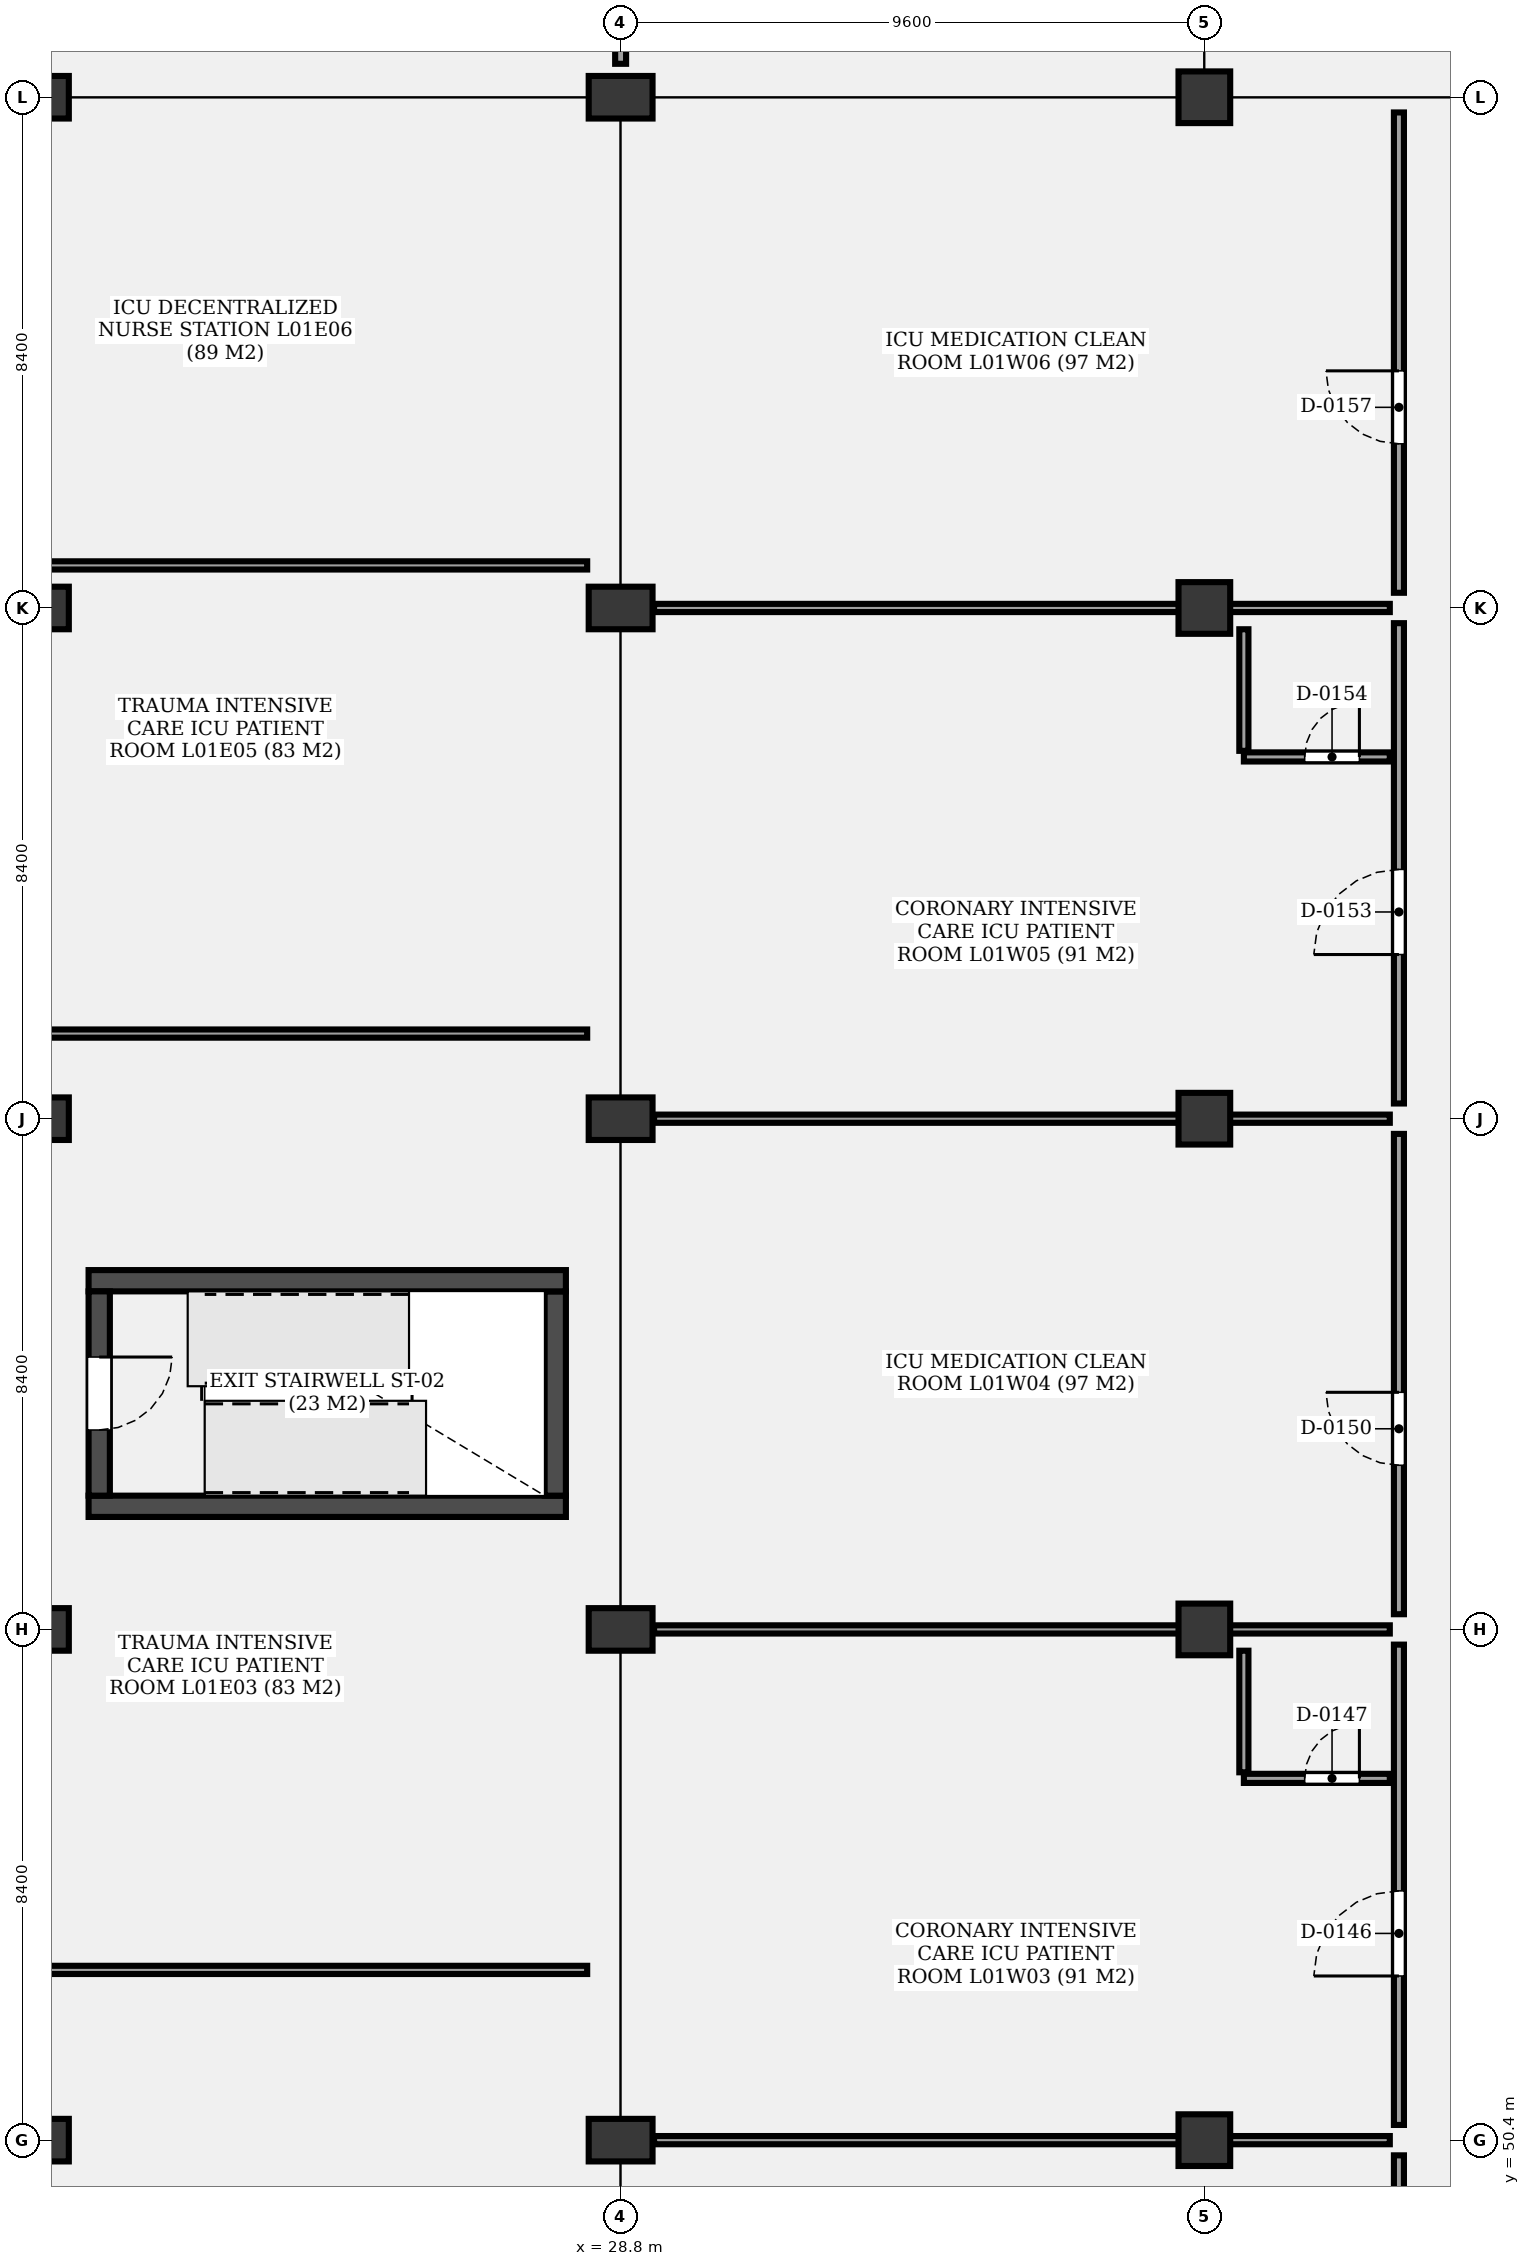
"""IFC4 building model, lengths in metres.
Left out: names, types, materials, properties, quantities, classifications, styles, units other than length and angle.
Written with IfcOpenShell. Run it as: python <this file> out.ifc"""

import sys

from ifc_helpers import new_model, si_unit, direction, frame, frame_2d, origin, origin_2d, place, context, subcontext, project, spatial, rectangle, extrude, element, fill, save


model = new_model("IFC4")
c1 = context("Model", 3, precision=1e-05, world=origin(), true_north=direction((0.0, 1.0)))
c2 = subcontext(c1, "Body", "Model", "MODEL_VIEW")
j1 = project(units=[si_unit("LENGTHUNIT", "METRE"), si_unit("PLANEANGLEUNIT", "RADIAN")], contexts=[c1])
p1 = place(None, origin())
s1 = spatial("IfcSite", under=j1, at=p1, CompositionType="ELEMENT")
p2 = place(p1, origin())
s2 = spatial("IfcBuilding", under=s1, at=p2, CompositionType="ELEMENT")
p3 = place(p2, frame((0.0, 0.0, 5.1)))
s3 = spatial("IfcBuildingStorey", under=s2, at=p3, CompositionType="ELEMENT", Elevation=5.1)
for number, where, z_axis, x_axis in (
    (1, (19.2, 50.4, 0.0), (0.0, 0.0, 1.0), (1.0, 0.0, 0.0)),
    (2, (19.2, 58.8, 0.0), (0.0, 0.0, 1.0), (1.0, 0.0, 0.0)),
    (3, (19.2, 67.2, 0.0), (0.0, 0.0, 1.0), (1.0, 0.0, 0.0)),
    (4, (19.2, 75.6, 0.0), (0.0, 0.0, 1.0), (1.0, 0.0, 0.0)),
    (5, (19.2, 84.0, 0.0), (0.0, 0.0, 1.0), (1.0, 0.0, 0.0)),
    (6, (28.8, 50.4, 0.0), (0.0, 0.0, 1.0), (1.0, 0.0, 0.0)),
    (7, (28.8, 58.8, 0.0), (0.0, 0.0, 1.0), (1.0, 0.0, 0.0)),
    (8, (28.8, 67.2, 0.0), (0.0, 0.0, 1.0), (1.0, 0.0, 0.0)),
    (9, (28.8, 75.6, 0.0), (0.0, 0.0, 1.0), (1.0, 0.0, 0.0)),
    (10, (28.8, 84.0, 0.0), (0.0, 0.0, 1.0), (1.0, 0.0, 0.0)),
):
    element("IfcColumn", number, at=place(p3, frame(where, z_axis=z_axis, x_axis=x_axis)), inside=s3, PredefinedType="COLUMN", context=c2, shape_type="SweptSolid", body=[
        extrude(rectangle(XDim=1.05, YDim=0.7, at=origin_2d()), origin(), (0.0, 0.0, 1.0), 4.8),
    ])
for number, where, z_axis, x_axis in (
    (11, (38.4, 50.4, 0.0), (0.0, 0.0, 1.0), (1.0, 0.0, 0.0)),
    (12, (38.4, 58.8, 0.0), (0.0, 0.0, 1.0), (1.0, 0.0, 0.0)),
    (13, (38.4, 67.2, 0.0), (0.0, 0.0, 1.0), (1.0, 0.0, 0.0)),
    (14, (38.4, 75.6, 0.0), (0.0, 0.0, 1.0), (1.0, 0.0, 0.0)),
    (15, (38.4, 84.0, 0.0), (0.0, 0.0, 1.0), (1.0, 0.0, 0.0)),
):
    element("IfcColumn", number, at=place(p3, frame(where, z_axis=z_axis, x_axis=x_axis)), inside=s3, PredefinedType="COLUMN", context=c2, shape_type="SweptSolid", body=[
        extrude(rectangle(XDim=0.85, YDim=0.85, at=origin_2d()), origin(), (0.0, 0.0, 1.0), 4.8),
    ])
p4 = place(p3, frame((20.05, 60.825, 0.0), z_axis=(0.0, 0.0, 1.0), x_axis=(1.0, 0.0, 0.0)))
e16 = element("IfcWall", 16, at=p4, inside=s3, PredefinedType="SHEAR", context=c2, shape_type="SweptSolid", body=[
    extrude(rectangle(XDim=7.85, YDim=0.35, at=frame_2d((3.925, 0.0))), origin(), (0.0, 0.0, 1.0), 4.8),
])
p5 = place(p3, frame((27.725, 61.0, 0.0), z_axis=(0.0, 0.0, 1.0), x_axis=(0.0, 1.0, 0.0)))
e17 = element("IfcWall", 17, at=p5, inside=s3, PredefinedType="SHEAR", context=c2, shape_type="SweptSolid", body=[
    extrude(rectangle(XDim=3.36, YDim=0.35, at=frame_2d((1.68, 0.0))), origin(), (0.0, 0.0, 1.0), 4.8),
])
p6 = place(p3, frame((27.9, 64.535, 0.0), z_axis=(0.0, 0.0, 1.0), x_axis=(-1.0, 0.0, 0.0)))
e18 = element("IfcWall", 18, at=p6, inside=s3, PredefinedType="SHEAR", context=c2, shape_type="SweptSolid", body=[
    extrude(rectangle(XDim=7.85, YDim=0.35, at=frame_2d((3.925, 0.0))), origin(), (0.0, 0.0, 1.0), 4.8),
])
p7 = place(p3, frame((20.225, 64.36, 0.0), z_axis=(0.0, 0.0, 1.0), x_axis=(0.0, -1.0, 0.0)))
e19 = element("IfcWall", 19, at=p7, inside=s3, PredefinedType="SHEAR", context=c2, shape_type="SweptSolid", body=[
    extrude(rectangle(XDim=3.36, YDim=0.35, at=frame_2d((1.68, 0.0))), origin(), (0.0, 0.0, 1.0), 4.8),
])
p8 = place(p7, frame((1.08, 0.0, 0.0)))
e20 = element("IfcOpeningElement", 20, at=p8, cuts=e19, PredefinedType="OPENING", context=c2, shape_type="SweptSolid", body=[
    extrude(rectangle(XDim=1.2, YDim=2.2, at=frame_2d((0.6, 1.1))), frame((0.0, 0.185, 0.0), z_axis=(0.0, -1.0, 0.0), x_axis=(1.0, 0.0, 0.0)), (0.0, 0.0, 1.0), 0.37),
])
p9 = place(p3, frame((28.8, 84.55, 0.0), z_axis=(0.0, 0.0, 1.0), x_axis=(0.0, 1.0, 0.0)))
e21 = element("IfcWall", 21, at=p9, inside=s3, PredefinedType="PARTITIONING", context=c2, shape_type="SweptSolid", body=[
    extrude(rectangle(XDim=17.3, YDim=0.18, at=frame_2d((8.65, 0.0))), origin(), (0.0, 0.0, 1.0), 3.68),
])
for number, where, z_axis, x_axis in (
    (22, (16.15, 53.2, 0.0), (0.0, 0.0, 1.0), (1.0, 0.0, 0.0)),
    (23, (16.15, 68.6, 0.0), (0.0, 0.0, 1.0), (1.0, 0.0, 0.0)),
    (24, (16.15, 76.3, 0.0), (0.0, 0.0, 1.0), (1.0, 0.0, 0.0)),
):
    element("IfcWall", number, at=place(p3, frame(where, z_axis=z_axis, x_axis=x_axis)), inside=s3, PredefinedType="PARTITIONING", context=c2, shape_type="SweptSolid", body=[
        extrude(rectangle(XDim=12.1, YDim=0.135, at=frame_2d((6.05, 0.0))), origin(), (0.0, 0.0, 1.0), 3.68),
    ])
p10 = place(p3, frame((41.6, 42.25, 0.0), z_axis=(0.0, 0.0, 1.0), x_axis=(0.0, 1.0, 0.0)))
e25 = element("IfcWall", 25, at=p10, inside=s3, PredefinedType="PARTITIONING", context=c2, shape_type="SweptSolid", body=[
    extrude(rectangle(XDim=7.9, YDim=0.165, at=frame_2d((3.95, 0.0))), origin(), (0.0, 0.0, 1.0), 3.68),
])
p11 = place(p10, frame((2.45, 0.0, 0.0)))
e26 = element("IfcOpeningElement", 26, at=p11, cuts=e25, PredefinedType="OPENING", context=c2, shape_type="SweptSolid", body=[
    extrude(rectangle(XDim=1.2, YDim=2.4, at=frame_2d((0.6, 1.2))), frame((0.0, 0.093, 0.0), z_axis=(0.0, -1.0, 0.0), x_axis=(1.0, 0.0, 0.0)), (0.0, 0.0, 1.0), 0.185),
])
p12 = place(p3, frame((41.6, 50.65, 0.0), z_axis=(0.0, 0.0, 1.0), x_axis=(0.0, 1.0, 0.0)))
e27 = element("IfcWall", 27, at=p12, inside=s3, PredefinedType="PARTITIONING", context=c2, shape_type="SweptSolid", body=[
    extrude(rectangle(XDim=7.9, YDim=0.165, at=frame_2d((3.95, 0.0))), origin(), (0.0, 0.0, 1.0), 3.68),
])
p13 = place(p12, frame((2.45, 0.0, 0.0)))
e28 = element("IfcOpeningElement", 28, at=p13, cuts=e27, PredefinedType="OPENING", context=c2, shape_type="SweptSolid", body=[
    extrude(rectangle(XDim=1.4, YDim=2.4, at=frame_2d((0.7, 1.2))), frame((0.0, 0.093, 0.0), z_axis=(0.0, -1.0, 0.0), x_axis=(1.0, 0.0, 0.0)), (0.0, 0.0, 1.0), 0.185),
])
p14 = place(p3, frame((39.05, 56.35, 0.0), z_axis=(0.0, 0.0, 1.0), x_axis=(1.0, 0.0, 0.0)))
e29 = element("IfcWall", 29, at=p14, inside=s3, PredefinedType="PARTITIONING", context=c2, shape_type="SweptSolid", body=[
    extrude(rectangle(XDim=2.4, YDim=0.15, at=frame_2d((1.2, 0.0))), origin(), (0.0, 0.0, 1.0), 3.68),
])
p15 = place(p14, frame((1.0, 0.0, 0.0)))
e30 = element("IfcOpeningElement", 30, at=p15, cuts=e29, PredefinedType="OPENING", context=c2, shape_type="SweptSolid", body=[
    extrude(rectangle(XDim=0.9, YDim=2.1, at=frame_2d((0.45, 1.05))), frame((0.0, 0.085, 0.0), z_axis=(0.0, -1.0, 0.0), x_axis=(1.0, 0.0, 0.0)), (0.0, 0.0, 1.0), 0.17),
])
p16 = place(p3, frame((39.05, 56.45, 0.0), z_axis=(0.0, 0.0, 1.0), x_axis=(0.0, 1.0, 0.0)))
e31 = element("IfcWall", 31, at=p16, inside=s3, PredefinedType="PARTITIONING", context=c2, shape_type="SweptSolid", body=[
    extrude(rectangle(XDim=2.0, YDim=0.15, at=frame_2d((1.0, 0.0))), origin(), (0.0, 0.0, 1.0), 3.68),
])
p17 = place(p3, frame((29.35, 50.4, 0.0), z_axis=(0.0, 0.0, 1.0), x_axis=(1.0, 0.0, 0.0)))
e32 = element("IfcWall", 32, at=p17, inside=s3, PredefinedType="PARTITIONING", context=c2, shape_type="SweptSolid", body=[
    extrude(rectangle(XDim=12.1, YDim=0.135, at=frame_2d((6.05, 0.0))), origin(), (0.0, 0.0, 1.0), 3.68),
])
p18 = place(p3, frame((41.6, 59.05, 0.0), z_axis=(0.0, 0.0, 1.0), x_axis=(0.0, 1.0, 0.0)))
e33 = element("IfcWall", 33, at=p18, inside=s3, PredefinedType="PARTITIONING", context=c2, shape_type="SweptSolid", body=[
    extrude(rectangle(XDim=7.9, YDim=0.165, at=frame_2d((3.95, 0.0))), origin(), (0.0, 0.0, 1.0), 3.68),
])
p19 = place(p18, frame((2.45, 0.0, 0.0)))
e34 = element("IfcOpeningElement", 34, at=p19, cuts=e33, PredefinedType="OPENING", context=c2, shape_type="SweptSolid", body=[
    extrude(rectangle(XDim=1.2, YDim=2.4, at=frame_2d((0.6, 1.2))), frame((0.0, 0.093, 0.0), z_axis=(0.0, -1.0, 0.0), x_axis=(1.0, 0.0, 0.0)), (0.0, 0.0, 1.0), 0.185),
])
p20 = place(p3, frame((29.35, 58.8, 0.0), z_axis=(0.0, 0.0, 1.0), x_axis=(1.0, 0.0, 0.0)))
e35 = element("IfcWall", 35, at=p20, inside=s3, PredefinedType="PARTITIONING", context=c2, shape_type="SweptSolid", body=[
    extrude(rectangle(XDim=12.1, YDim=0.135, at=frame_2d((6.05, 0.0))), origin(), (0.0, 0.0, 1.0), 3.68),
])
p21 = place(p3, frame((41.6, 67.45, 0.0), z_axis=(0.0, 0.0, 1.0), x_axis=(0.0, 1.0, 0.0)))
e36 = element("IfcWall", 36, at=p21, inside=s3, PredefinedType="PARTITIONING", context=c2, shape_type="SweptSolid", body=[
    extrude(rectangle(XDim=7.9, YDim=0.165, at=frame_2d((3.95, 0.0))), origin(), (0.0, 0.0, 1.0), 3.68),
])
p22 = place(p21, frame((2.45, 0.0, 0.0)))
e37 = element("IfcOpeningElement", 37, at=p22, cuts=e36, PredefinedType="OPENING", context=c2, shape_type="SweptSolid", body=[
    extrude(rectangle(XDim=1.4, YDim=2.4, at=frame_2d((0.7, 1.2))), frame((0.0, 0.093, 0.0), z_axis=(0.0, -1.0, 0.0), x_axis=(1.0, 0.0, 0.0)), (0.0, 0.0, 1.0), 0.185),
])
p23 = place(p3, frame((39.05, 73.15, 0.0), z_axis=(0.0, 0.0, 1.0), x_axis=(1.0, 0.0, 0.0)))
e38 = element("IfcWall", 38, at=p23, inside=s3, PredefinedType="PARTITIONING", context=c2, shape_type="SweptSolid", body=[
    extrude(rectangle(XDim=2.4, YDim=0.15, at=frame_2d((1.2, 0.0))), origin(), (0.0, 0.0, 1.0), 3.68),
])
p24 = place(p23, frame((1.0, 0.0, 0.0)))
e39 = element("IfcOpeningElement", 39, at=p24, cuts=e38, PredefinedType="OPENING", context=c2, shape_type="SweptSolid", body=[
    extrude(rectangle(XDim=0.9, YDim=2.1, at=frame_2d((0.45, 1.05))), frame((0.0, 0.085, 0.0), z_axis=(0.0, -1.0, 0.0), x_axis=(1.0, 0.0, 0.0)), (0.0, 0.0, 1.0), 0.17),
])
p25 = place(p3, frame((39.05, 73.25, 0.0), z_axis=(0.0, 0.0, 1.0), x_axis=(0.0, 1.0, 0.0)))
e40 = element("IfcWall", 40, at=p25, inside=s3, PredefinedType="PARTITIONING", context=c2, shape_type="SweptSolid", body=[
    extrude(rectangle(XDim=2.0, YDim=0.15, at=frame_2d((1.0, 0.0))), origin(), (0.0, 0.0, 1.0), 3.68),
])
p26 = place(p3, frame((29.35, 67.2, 0.0), z_axis=(0.0, 0.0, 1.0), x_axis=(1.0, 0.0, 0.0)))
e41 = element("IfcWall", 41, at=p26, inside=s3, PredefinedType="PARTITIONING", context=c2, shape_type="SweptSolid", body=[
    extrude(rectangle(XDim=12.1, YDim=0.135, at=frame_2d((6.05, 0.0))), origin(), (0.0, 0.0, 1.0), 3.68),
])
p27 = place(p3, frame((41.6, 75.85, 0.0), z_axis=(0.0, 0.0, 1.0), x_axis=(0.0, 1.0, 0.0)))
e42 = element("IfcWall", 42, at=p27, inside=s3, PredefinedType="PARTITIONING", context=c2, shape_type="SweptSolid", body=[
    extrude(rectangle(XDim=7.9, YDim=0.165, at=frame_2d((3.95, 0.0))), origin(), (0.0, 0.0, 1.0), 3.68),
])
p28 = place(p27, frame((2.45, 0.0, 0.0)))
e43 = element("IfcOpeningElement", 43, at=p28, cuts=e42, PredefinedType="OPENING", context=c2, shape_type="SweptSolid", body=[
    extrude(rectangle(XDim=1.2, YDim=2.4, at=frame_2d((0.6, 1.2))), frame((0.0, 0.093, 0.0), z_axis=(0.0, -1.0, 0.0), x_axis=(1.0, 0.0, 0.0)), (0.0, 0.0, 1.0), 0.185),
])
p29 = place(p3, frame((29.35, 75.6, 0.0), z_axis=(0.0, 0.0, 1.0), x_axis=(1.0, 0.0, 0.0)))
e44 = element("IfcWall", 44, at=p29, inside=s3, PredefinedType="PARTITIONING", context=c2, shape_type="SweptSolid", body=[
    extrude(rectangle(XDim=12.1, YDim=0.135, at=frame_2d((6.05, 0.0))), origin(), (0.0, 0.0, 1.0), 3.68),
])
p30 = place(p8, origin())
e45 = element("IfcDoor", 45, at=p30, inside=s3, OperationType="SINGLE_SWING_LEFT", PredefinedType="DOOR", context=c2, shape_type="SweptSolid", body=[
    extrude(rectangle(XDim=1.2, YDim=2.2, at=frame_2d((0.6, 1.1))), frame((0.0, 0.025, 0.0), z_axis=(0.0, -1.0, 0.0), x_axis=(1.0, 0.0, 0.0)), (0.0, 0.0, 1.0), 0.05),
])
fill(e20, e45)
p31 = place(p13, origin())
e46 = element("IfcDoor", 46, at=p31, inside=s3, OperationType="SINGLE_SWING_LEFT", PredefinedType="DOOR", context=c2, shape_type="SweptSolid", body=[
    extrude(rectangle(XDim=1.4, YDim=2.4, at=frame_2d((0.7, 1.2))), frame((0.0, 0.025, 0.0), z_axis=(0.0, -1.0, 0.0), x_axis=(1.0, 0.0, 0.0)), (0.0, 0.0, 1.0), 0.05),
])
fill(e28, e46)
p32 = place(p15, origin())
e47 = element("IfcDoor", 47, at=p32, inside=s3, OperationType="SINGLE_SWING_RIGHT", PredefinedType="DOOR", context=c2, shape_type="SweptSolid", body=[
    extrude(rectangle(XDim=0.9, YDim=2.1, at=frame_2d((0.45, 1.05))), frame((0.0, 0.025, 0.0), z_axis=(0.0, -1.0, 0.0), x_axis=(1.0, 0.0, 0.0)), (0.0, 0.0, 1.0), 0.05),
])
fill(e30, e47)
p33 = place(p19, origin())
e48 = element("IfcDoor", 48, at=p33, inside=s3, OperationType="SINGLE_SWING_RIGHT", PredefinedType="DOOR", context=c2, shape_type="SweptSolid", body=[
    extrude(rectangle(XDim=1.2, YDim=2.4, at=frame_2d((0.6, 1.2))), frame((0.0, 0.025, 0.0), z_axis=(0.0, -1.0, 0.0), x_axis=(1.0, 0.0, 0.0)), (0.0, 0.0, 1.0), 0.05),
])
fill(e34, e48)
p34 = place(p22, origin())
e49 = element("IfcDoor", 49, at=p34, inside=s3, OperationType="SINGLE_SWING_LEFT", PredefinedType="DOOR", context=c2, shape_type="SweptSolid", body=[
    extrude(rectangle(XDim=1.4, YDim=2.4, at=frame_2d((0.7, 1.2))), frame((0.0, 0.025, 0.0), z_axis=(0.0, -1.0, 0.0), x_axis=(1.0, 0.0, 0.0)), (0.0, 0.0, 1.0), 0.05),
])
fill(e37, e49)
p35 = place(p24, origin())
e50 = element("IfcDoor", 50, at=p35, inside=s3, OperationType="SINGLE_SWING_RIGHT", PredefinedType="DOOR", context=c2, shape_type="SweptSolid", body=[
    extrude(rectangle(XDim=0.9, YDim=2.1, at=frame_2d((0.45, 1.05))), frame((0.0, 0.025, 0.0), z_axis=(0.0, -1.0, 0.0), x_axis=(1.0, 0.0, 0.0)), (0.0, 0.0, 1.0), 0.05),
])
fill(e39, e50)
p36 = place(p28, origin())
e51 = element("IfcDoor", 51, at=p36, inside=s3, OperationType="SINGLE_SWING_RIGHT", PredefinedType="DOOR", context=c2, shape_type="SweptSolid", body=[
    extrude(rectangle(XDim=1.2, YDim=2.4, at=frame_2d((0.6, 1.2))), frame((0.0, 0.025, 0.0), z_axis=(0.0, -1.0, 0.0), x_axis=(1.0, 0.0, 0.0)), (0.0, 0.0, 1.0), 0.05),
])
fill(e43, e51)
save(model, sys.argv[1])
